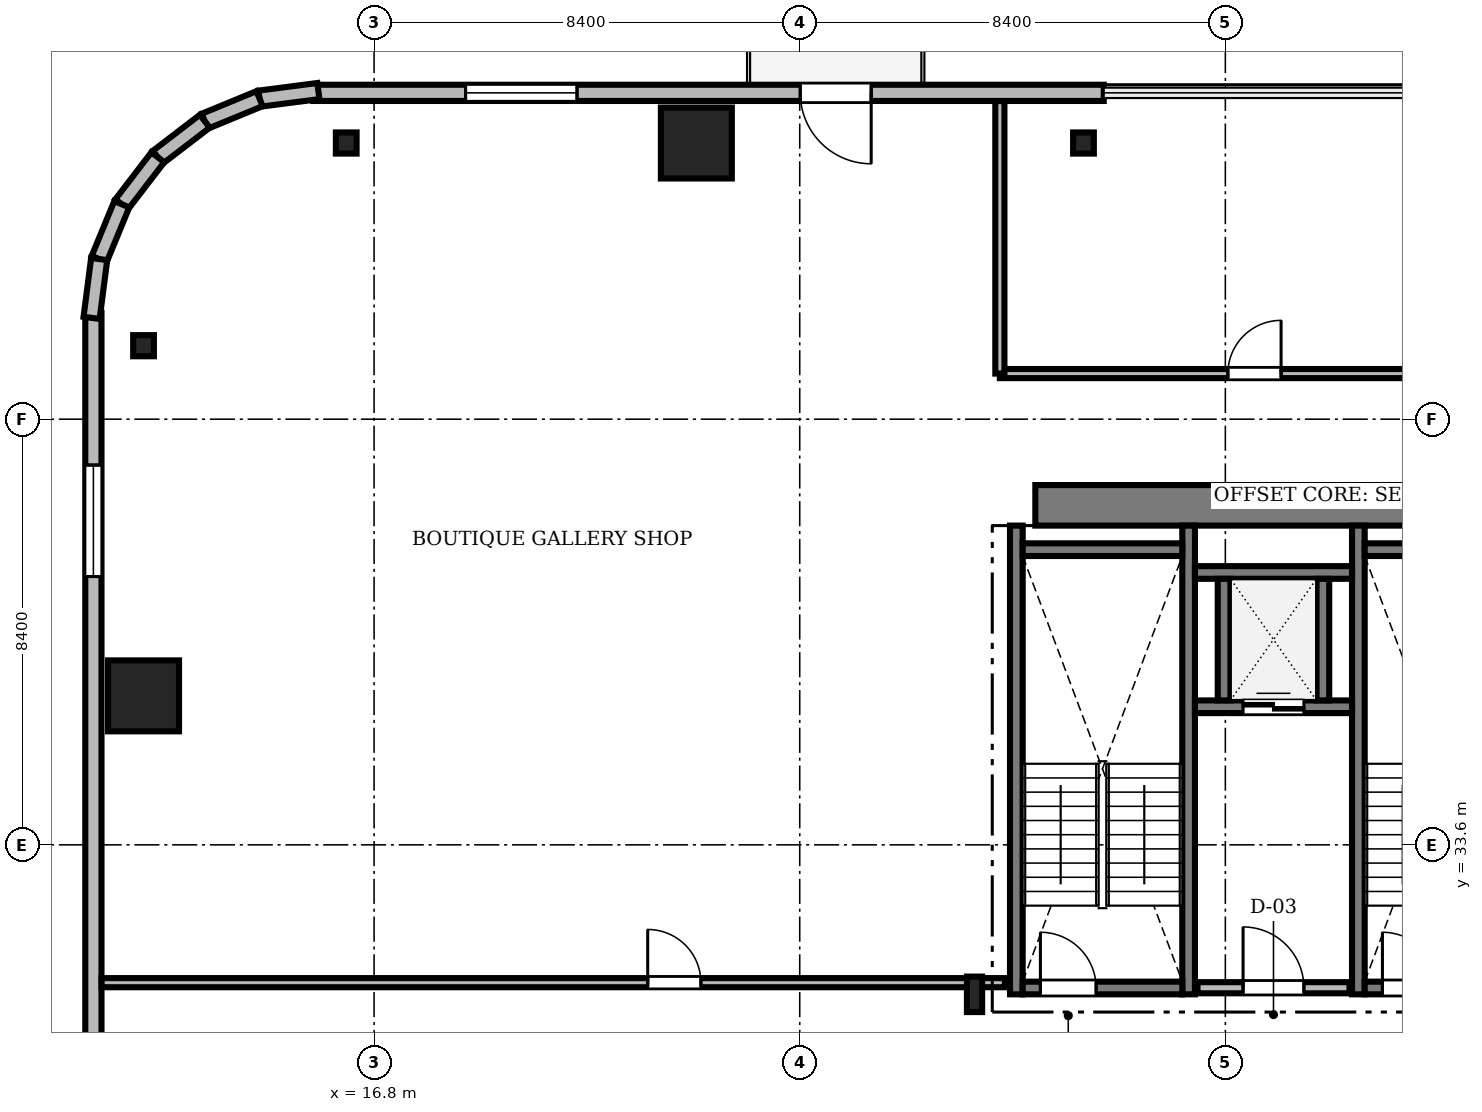
"""IFC4 building model, lengths in metres.
Left out: names, types, materials, properties, quantities, classifications, styles, units other than length and angle.
Written with IfcOpenShell. Run it as: python <this file> out.ifc"""

import sys

from ifc_helpers import new_model, si_unit, direction, frame, frame_2d, origin, origin_2d, place, context, subcontext, project, spatial, rectangle, i_section, extrude, source, transform, mapped, element, fill, save


model = new_model("IFC4")
c1 = context("Model", 3, precision=1e-05, world=origin(), true_north=direction((0.0, 1.0)))
c2 = subcontext(c1, "Body", "Model", "MODEL_VIEW")
j1 = project(units=[si_unit("LENGTHUNIT", "METRE"), si_unit("PLANEANGLEUNIT", "RADIAN")], contexts=[c1])
p1 = place(None, origin())
s1 = spatial("IfcSite", under=j1, at=p1, CompositionType="ELEMENT")
p2 = place(p1, origin())
s2 = spatial("IfcBuilding", under=s1, at=p2, CompositionType="ELEMENT")
p3 = place(p2, frame((0.0, 0.0, 229.8)))
s3 = spatial("IfcBuildingStorey", under=s2, at=p3, CompositionType="ELEMENT", Elevation=229.8)
m1 = source(origin(), c2, "Body", "SweptSolid", [
    extrude(rectangle(XDim=17.52, YDim=0.8, at=frame_2d((8.76, 0.0))), origin(), (0.0, 0.0, 1.0), 3.53),
])
p4 = place(p3, frame((29.85, 40.3, 0.0), z_axis=(0.0, 0.0, 1.0), x_axis=(1.0, 0.0, 0.0)))
e1 = element("IfcWall", 1, at=p4, inside=s3, PredefinedType="SHEAR", context=c2, shape_type="MappedRepresentation", body=[
    mapped(m1, transform((0.0, 0.0, 0.0), scale=1.0)),
])
m2 = source(origin(), c2, "Body", "SweptSolid", [
    extrude(i_section(OverallWidth=0.3, OverallDepth=0.7, WebThickness=0.017, FlangeThickness=0.032, FilletRadius=0.027, at=origin_2d()), origin(), (0.0, 0.0, 1.0), 3.53),
])
p5 = place(p3, frame((28.65, 30.65, 0.0), z_axis=(0.0, 0.0, 1.0), x_axis=(1.0, 0.0, 0.0)))
e2 = element("IfcColumn", 2, at=p5, inside=s3, PredefinedType="COLUMN", context=c2, shape_type="MappedRepresentation", body=[
    mapped(m2, transform((0.0, 0.0, 0.0), scale=1.0)),
])
m3 = source(origin(), c2, "Body", "SweptSolid", [
    extrude(rectangle(XDim=1.4, YDim=1.4, at=origin_2d()), origin(), (0.0, 0.0, 1.0), 3.53),
])
for number, where, z_axis, x_axis in (
    (3, (23.16, 47.45, 0.0), (0.0, 0.0, 1.0), (1.0, 0.0, 0.0)),
    (4, (12.25, 36.54, 0.0), (0.0, 0.0, 1.0), (1.0, 0.0, 0.0)),
):
    element("IfcColumn", number, at=place(p3, frame(where, z_axis=z_axis, x_axis=x_axis)), inside=s3, PredefinedType="COLUMN", context=c2, shape_type="MappedRepresentation", body=[
        mapped(m3, transform((0.0, 0.0, 0.0), scale=1.0)),
    ])
m4 = source(origin(), c2, "Body", "SweptSolid", [
    extrude(i_section(OverallWidth=0.409, OverallDepth=0.417, WebThickness=0.021, FlangeThickness=0.033, FilletRadius=0.015, at=origin_2d()), origin(), (0.0, 0.0, 1.0), 3.53),
])
for number, where, z_axis, x_axis in (
    (5, (30.8, 47.45, 0.0), (0.0, 0.0, 1.0), (1.0, 0.0, 0.0)),
    (6, (16.25, 47.45, 0.0), (0.0, 0.0, 1.0), (1.0, 0.0, 0.0)),
    (7, (12.25, 43.45, 0.0), (0.0, 0.0, 1.0), (1.0, 0.0, 0.0)),
):
    element("IfcColumn", number, at=place(p3, frame(where, z_axis=z_axis, x_axis=x_axis)), inside=s3, PredefinedType="COLUMN", context=c2, shape_type="MappedRepresentation", body=[
        mapped(m4, transform((0.0, 0.0, 0.0), scale=1.0)),
    ])
m5 = source(origin(), c2, "Body", "SweptSolid", [
    extrude(rectangle(XDim=15.6, YDim=0.32, at=frame_2d((7.8, 0.0))), origin(), (0.0, 0.0, 1.0), 3.53),
])
p6 = place(p3, frame((31.2, 48.44, 0.0), z_axis=(0.0, 0.0, 1.0), x_axis=(-1.0, 0.0, 0.0)))
e8 = element("IfcWall", 8, at=p6, inside=s3, PredefinedType="SOLIDWALL", context=c2, shape_type="MappedRepresentation", body=[
    mapped(m5, transform((0.0, 0.0, 0.0), scale=1.0)),
])
m6 = source(origin(), c2, "Body", "SweptSolid", [
    extrude(rectangle(XDim=1.4, YDim=2.3, at=frame_2d((0.7, 1.15))), frame((0.0, 0.17, 0.0), z_axis=(0.0, -1.0, 0.0), x_axis=(1.0, 0.0, 0.0)), (0.0, 0.0, 1.0), 0.34),
])
p7 = place(p6, frame((4.59, 0.0, 0.0)))
e9 = element("IfcOpeningElement", 9, at=p7, cuts=e8, PredefinedType="OPENING", context=c2, shape_type="MappedRepresentation", body=[
    mapped(m6, transform((0.0, 0.0, 0.0), scale=1.0)),
])
m7 = source(origin(), c2, "Body", "SweptSolid", [
    extrude(rectangle(XDim=2.2, YDim=2.4, at=frame_2d((1.1, 1.2))), frame((0.0, 0.17, 0.0), z_axis=(0.0, -1.0, 0.0), x_axis=(1.0, 0.0, 0.0)), (0.0, 0.0, 1.0), 0.34),
])
p8 = place(p6, frame((10.395, 0.0, 0.72)))
e10 = element("IfcOpeningElement", 10, at=p8, cuts=e8, PredefinedType="OPENING", context=c2, shape_type="MappedRepresentation", body=[
    mapped(m7, transform((0.0, 0.0, 0.0), scale=1.0)),
])
m8 = source(origin(), c2, "Body", "SweptSolid", [
    extrude(rectangle(XDim=15.6, YDim=0.32, at=frame_2d((7.8, 0.0))), origin(), (0.0, 0.0, 1.0), 3.53),
])
p9 = place(p3, frame((11.26, 44.1, 0.0), z_axis=(0.0, 0.0, 1.0), x_axis=(0.0, -1.0, 0.0)))
e11 = element("IfcWall", 11, at=p9, inside=s3, PredefinedType="SOLIDWALL", context=c2, shape_type="MappedRepresentation", body=[
    mapped(m8, transform((0.0, 0.0, 0.0), scale=1.0)),
])
p10 = place(p9, frame((3.005, 0.0, 0.72)))
e12 = element("IfcOpeningElement", 12, at=p10, cuts=e11, PredefinedType="OPENING", context=c2, shape_type="MappedRepresentation", body=[
    mapped(m7, transform((0.0, 0.0, 0.0), scale=1.0)),
])
m9 = source(origin(), c2, "Body", "SweptSolid", [
    extrude(rectangle(XDim=1.17, YDim=0.32, at=frame_2d((0.585, 0.0))), origin(), (0.0, 0.0, 1.0), 3.53),
])
p11 = place(p3, frame((15.7, 48.476, 0.0), z_axis=(0.0, 0.0, 1.0), x_axis=(-0.991735963317, -0.128295670475, 0.0)))
e13 = element("IfcWall", 13, at=p11, inside=s3, PredefinedType="SOLIDWALL", context=c2, shape_type="MappedRepresentation", body=[
    mapped(m9, transform((0.0, 0.0, 0.0), scale=1.0)),
])
m10 = source(origin(), c2, "Body", "SweptSolid", [
    extrude(rectangle(XDim=1.169, YDim=0.32, at=frame_2d((0.584, 0.0))), origin(), (0.0, 0.0, 1.0), 3.53),
])
p12 = place(p3, frame((14.54, 48.325, 0.0), z_axis=(0.0, 0.0, 1.0), x_axis=(-0.924552646638, -0.381054331552, 0.0)))
e14 = element("IfcWall", 14, at=p12, inside=s3, PredefinedType="SOLIDWALL", context=c2, shape_type="MappedRepresentation", body=[
    mapped(m10, transform((0.0, 0.0, 0.0), scale=1.0)),
])
m11 = source(origin(), c2, "Body", "SweptSolid", [
    extrude(rectangle(XDim=1.169, YDim=0.32, at=frame_2d((0.584, 0.0))), origin(), (0.0, 0.0, 1.0), 3.53),
])
p13 = place(p3, frame((13.459, 47.88, 0.0), z_axis=(0.0, 0.0, 1.0), x_axis=(-0.793663520347, -0.608356981114, 0.0)))
e15 = element("IfcWall", 15, at=p13, inside=s3, PredefinedType="SOLIDWALL", context=c2, shape_type="MappedRepresentation", body=[
    mapped(m11, transform((0.0, 0.0, 0.0), scale=1.0)),
])
m12 = source(origin(), c2, "Body", "SweptSolid", [
    extrude(rectangle(XDim=1.169, YDim=0.32, at=frame_2d((0.584, 0.0))), origin(), (0.0, 0.0, 1.0), 3.53),
])
p14 = place(p3, frame((12.531, 47.169, 0.0), z_axis=(0.0, 0.0, 1.0), x_axis=(-0.608387696831, -0.793639975269, 0.0)))
e16 = element("IfcWall", 16, at=p14, inside=s3, PredefinedType="SOLIDWALL", context=c2, shape_type="MappedRepresentation", body=[
    mapped(m12, transform((0.0, 0.0, 0.0), scale=1.0)),
])
p15 = place(p3, frame((11.82, 46.241, 0.0), z_axis=(0.0, 0.0, 1.0), x_axis=(-0.381054331552, -0.924552646638, 0.0)))
e17 = element("IfcWall", 17, at=p15, inside=s3, PredefinedType="SOLIDWALL", context=c2, shape_type="MappedRepresentation", body=[
    mapped(m10, transform((0.0, 0.0, 0.0), scale=1.0)),
])
p16 = place(p3, frame((11.375, 45.16, 0.0), z_axis=(0.0, 0.0, 1.0), x_axis=(-0.128295670475, -0.991735963317, 0.0)))
e18 = element("IfcWall", 18, at=p16, inside=s3, PredefinedType="SOLIDWALL", context=c2, shape_type="MappedRepresentation", body=[
    mapped(m9, transform((0.0, 0.0, 0.0), scale=1.0)),
])
m13 = source(origin(), c2, "Body", "SweptSolid", [
    extrude(rectangle(XDim=9.25, YDim=0.25, at=frame_2d((4.625, 0.0))), origin(), (0.0, 0.0, 1.0), 3.55),
])
for number, where, z_axis, x_axis in (
    (19, (29.475, 30.65, 0.0), (0.0, 0.0, 1.0), (0.0, 1.0, 0.0)),
    (20, (32.875, 30.65, 0.0), (0.0, 0.0, 1.0), (0.0, 1.0, 0.0)),
):
    element("IfcWall", number, at=place(p3, frame(where, z_axis=z_axis, x_axis=x_axis)), inside=s3, PredefinedType="SOLIDWALL", context=c2, shape_type="MappedRepresentation", body=[
        mapped(m13, transform((0.0, 0.0, 0.0), scale=1.0)),
    ])
m14 = source(origin(), c2, "Body", "SweptSolid", [
    extrude(rectangle(XDim=3.15, YDim=0.25, at=frame_2d((1.575, 0.0))), origin(), (0.0, 0.0, 1.0), 3.55),
])
p17 = place(p3, frame((29.6, 39.425, 0.0), z_axis=(0.0, 0.0, 1.0), x_axis=(1.0, 0.0, 0.0)))
e21 = element("IfcWall", 21, at=p17, inside=s3, PredefinedType="SOLIDWALL", context=c2, shape_type="MappedRepresentation", body=[
    mapped(m14, transform((0.0, 0.0, 0.0), scale=1.0)),
])
p18 = place(p3, frame((29.6, 30.775, 0.0), z_axis=(0.0, 0.0, 1.0), x_axis=(1.0, 0.0, 0.0)))
e22 = element("IfcWall", 22, at=p18, inside=s3, PredefinedType="SOLIDWALL", context=c2, shape_type="MappedRepresentation", body=[
    mapped(m14, transform((0.0, 0.0, 0.0), scale=1.0)),
])
m15 = source(origin(), c2, "Body", "SweptSolid", [
    extrude(rectangle(XDim=1.1, YDim=2.2, at=frame_2d((0.55, 1.1))), frame((0.0, 0.135, 0.0), z_axis=(0.0, -1.0, 0.0), x_axis=(1.0, 0.0, 0.0)), (0.0, 0.0, 1.0), 0.27),
])
p19 = place(p18, frame((0.35, 0.0, 0.0)))
e23 = element("IfcOpeningElement", 23, at=p19, cuts=e22, PredefinedType="OPENING", context=c2, shape_type="MappedRepresentation", body=[
    mapped(m15, transform((0.0, 0.0, 0.0), scale=1.0)),
])
p20 = place(p3, frame((36.225, 30.65, 0.0), z_axis=(0.0, 0.0, 1.0), x_axis=(0.0, 1.0, 0.0)))
e24 = element("IfcWall", 24, at=p20, inside=s3, PredefinedType="SOLIDWALL", context=c2, shape_type="MappedRepresentation", body=[
    mapped(m13, transform((0.0, 0.0, 0.0), scale=1.0)),
])
p21 = place(p3, frame((36.35, 39.425, 0.0), z_axis=(0.0, 0.0, 1.0), x_axis=(1.0, 0.0, 0.0)))
e25 = element("IfcWall", 25, at=p21, inside=s3, PredefinedType="SOLIDWALL", context=c2, shape_type="MappedRepresentation", body=[
    mapped(m14, transform((0.0, 0.0, 0.0), scale=1.0)),
])
p22 = place(p3, frame((36.35, 30.775, 0.0), z_axis=(0.0, 0.0, 1.0), x_axis=(1.0, 0.0, 0.0)))
e26 = element("IfcWall", 26, at=p22, inside=s3, PredefinedType="SOLIDWALL", context=c2, shape_type="MappedRepresentation", body=[
    mapped(m14, transform((0.0, 0.0, 0.0), scale=1.0)),
])
p23 = place(p22, frame((0.35, 0.0, 0.0)))
e27 = element("IfcOpeningElement", 27, at=p23, cuts=e26, PredefinedType="OPENING", context=c2, shape_type="MappedRepresentation", body=[
    mapped(m15, transform((0.0, 0.0, 0.0), scale=1.0)),
])
m16 = source(origin(), c2, "Body", "SweptSolid", [
    extrude(rectangle(XDim=3.0, YDim=0.22, at=frame_2d((1.5, 0.0))), origin(), (0.0, 0.0, 1.0), 3.53),
])
p24 = place(p3, frame((33.05, 30.78, 0.0), z_axis=(0.0, 0.0, 1.0), x_axis=(1.0, 0.0, 0.0)))
e28 = element("IfcWall", 28, at=p24, inside=s3, PredefinedType="SOLIDWALL", context=c2, shape_type="MappedRepresentation", body=[
    mapped(m16, transform((0.0, 0.0, 0.0), scale=1.0)),
])
m17 = source(origin(), c2, "Body", "SweptSolid", [
    extrude(rectangle(XDim=1.2, YDim=2.2, at=frame_2d((0.6, 1.1))), frame((0.0, 0.12, 0.0), z_axis=(0.0, -1.0, 0.0), x_axis=(1.0, 0.0, 0.0)), (0.0, 0.0, 1.0), 0.24),
])
p25 = place(p24, frame((0.9, 0.0, 0.0)))
e29 = element("IfcOpeningElement", 29, at=p25, cuts=e28, PredefinedType="OPENING", context=c2, shape_type="MappedRepresentation", body=[
    mapped(m17, transform((0.0, 0.0, 0.0), scale=1.0)),
])
m18 = source(origin(), c2, "Body", "SweptSolid", [
    extrude(rectangle(XDim=3.1, YDim=0.25, at=frame_2d((1.55, 0.0))), origin(), (0.0, 0.0, 1.0), 3.53),
])
p26 = place(p3, frame((33.0, 36.325, 0.0), z_axis=(0.0, 0.0, 1.0), x_axis=(1.0, 0.0, 0.0)))
e30 = element("IfcWall", 30, at=p26, inside=s3, PredefinedType="SOLIDWALL", context=c2, shape_type="MappedRepresentation", body=[
    mapped(m18, transform((0.0, 0.0, 0.0), scale=1.0)),
])
m19 = source(origin(), c2, "Body", "SweptSolid", [
    extrude(rectangle(XDim=1.2, YDim=2.25, at=frame_2d((0.6, 1.125))), frame((0.0, 0.135, 0.0), z_axis=(0.0, -1.0, 0.0), x_axis=(1.0, 0.0, 0.0)), (0.0, 0.0, 1.0), 0.27),
])
p27 = place(p26, frame((0.95, 0.0, 0.0)))
e31 = element("IfcOpeningElement", 31, at=p27, cuts=e30, PredefinedType="OPENING", context=c2, shape_type="MappedRepresentation", body=[
    mapped(m19, transform((0.0, 0.0, 0.0), scale=1.0)),
])
p28 = place(p3, frame((33.0, 38.975, 0.0), z_axis=(0.0, 0.0, 1.0), x_axis=(1.0, 0.0, 0.0)))
e32 = element("IfcWall", 32, at=p28, inside=s3, PredefinedType="SOLIDWALL", context=c2, shape_type="MappedRepresentation", body=[
    mapped(m18, transform((0.0, 0.0, 0.0), scale=1.0)),
])
m20 = source(origin(), c2, "Body", "SweptSolid", [
    extrude(rectangle(XDim=2.4, YDim=0.25, at=frame_2d((1.2, 0.0))), origin(), (0.0, 0.0, 1.0), 3.53),
])
for number, where, z_axis, x_axis in (
    (33, (33.575, 36.45, 0.0), (0.0, 0.0, 1.0), (0.0, 1.0, 0.0)),
    (34, (35.525, 36.45, 0.0), (0.0, 0.0, 1.0), (0.0, 1.0, 0.0)),
):
    element("IfcWall", number, at=place(p3, frame(where, z_axis=z_axis, x_axis=x_axis)), inside=s3, PredefinedType="SOLIDWALL", context=c2, shape_type="MappedRepresentation", body=[
        mapped(m20, transform((0.0, 0.0, 0.0), scale=1.0)),
    ])
m21 = source(origin(), c2, "Body", "SweptSolid", [
    extrude(rectangle(XDim=28.428, YDim=0.18, at=frame_2d((14.214, 0.0))), origin(), (0.0, 0.0, 1.0), 2.772),
])
p29 = place(p3, frame((29.15, 42.9, 0.0), z_axis=(0.0, 0.0, 1.0), x_axis=(1.0, 0.0, 0.0)))
e35 = element("IfcWall", 35, at=p29, inside=s3, PredefinedType="PARTITIONING", context=c2, shape_type="MappedRepresentation", body=[
    mapped(m21, transform((0.0, 0.0, 0.0), scale=1.0)),
])
m22 = source(origin(), c2, "Body", "SweptSolid", [
    extrude(rectangle(XDim=1.05, YDim=2.2, at=frame_2d((0.525, 1.1))), frame((0.0, 0.1, 0.0), z_axis=(0.0, -1.0, 0.0), x_axis=(1.0, 0.0, 0.0)), (0.0, 0.0, 1.0), 0.2),
])
p30 = place(p29, frame((4.5, 0.0, 0.0)))
e36 = element("IfcOpeningElement", 36, at=p30, cuts=e35, PredefinedType="OPENING", context=c2, shape_type="MappedRepresentation", body=[
    mapped(m22, transform((0.0, 0.0, 0.0), scale=1.0)),
])
m23 = source(origin(), c2, "Body", "SweptSolid", [
    extrude(rectangle(XDim=17.828, YDim=0.18, at=frame_2d((8.914, 0.0))), origin(), (0.0, 0.0, 1.0), 2.772),
])
p31 = place(p3, frame((11.422, 30.88, 0.0), z_axis=(0.0, 0.0, 1.0), x_axis=(1.0, 0.0, 0.0)))
e37 = element("IfcWall", 37, at=p31, inside=s3, PredefinedType="PARTITIONING", context=c2, shape_type="MappedRepresentation", body=[
    mapped(m23, transform((0.0, 0.0, 0.0), scale=1.0)),
])
p32 = place(p31, frame((10.778, 0.0, 0.0)))
e38 = element("IfcOpeningElement", 38, at=p32, cuts=e37, PredefinedType="OPENING", context=c2, shape_type="MappedRepresentation", body=[
    mapped(m22, transform((0.0, 0.0, 0.0), scale=1.0)),
])
m24 = source(origin(), c2, "Body", "SweptSolid", [
    extrude(rectangle(XDim=5.378, YDim=0.18, at=frame_2d((2.689, 0.0))), origin(), (0.0, 0.0, 1.0), 2.772),
])
p33 = place(p3, frame((29.15, 42.9, 0.0), z_axis=(0.0, 0.0, 1.0), x_axis=(0.0, 1.0, 0.0)))
e39 = element("IfcWall", 39, at=p33, inside=s3, PredefinedType="PARTITIONING", context=c2, shape_type="MappedRepresentation", body=[
    mapped(m24, transform((0.0, 0.0, 0.0), scale=1.0)),
])
m25 = source(origin(), c2, "Body", "SweptSolid", [
    extrude(rectangle(XDim=1.4, YDim=2.3, at=frame_2d((0.7, 1.15))), frame((0.0, 0.025, 0.0), z_axis=(0.0, -1.0, 0.0), x_axis=(1.0, 0.0, 0.0)), (0.0, 0.0, 1.0), 0.05),
])
p34 = place(p7, frame((1.4, 0.0, 0.0), z_axis=(0.0, 0.0, 1.0), x_axis=(-1.0, 0.0, 0.0)))
e40 = element("IfcDoor", 40, at=p34, inside=s3, OperationType="DOUBLE_DOOR_SLIDING", PredefinedType="DOOR", context=c2, shape_type="MappedRepresentation", body=[
    mapped(m25, transform((0.0, 0.0, 0.0), scale=1.0)),
])
fill(e9, e40)
m26 = source(origin(), c2, "Body", "SweptSolid", [
    extrude(rectangle(XDim=2.2, YDim=2.4, at=frame_2d((1.1, 1.2))), frame((0.0, 0.03, 0.0), z_axis=(0.0, -1.0, 0.0), x_axis=(1.0, 0.0, 0.0)), (0.0, 0.0, 1.0), 0.06),
])
p35 = place(p8, origin())
e41 = element("IfcWindow", 41, at=p35, inside=s3, PartitioningType="SINGLE_PANEL", PredefinedType="WINDOW", context=c2, shape_type="MappedRepresentation", body=[
    mapped(m26, transform((0.0, 0.0, 0.0), scale=1.0)),
])
fill(e10, e41)
p36 = place(p10, origin())
e42 = element("IfcWindow", 42, at=p36, inside=s3, PartitioningType="SINGLE_PANEL", PredefinedType="WINDOW", context=c2, shape_type="MappedRepresentation", body=[
    mapped(m26, transform((0.0, 0.0, 0.0), scale=1.0)),
])
fill(e12, e42)
m27 = source(origin(), c2, "Body", "SweptSolid", [
    extrude(rectangle(XDim=1.1, YDim=2.2, at=frame_2d((0.55, 1.1))), frame((0.0, 0.025, 0.0), z_axis=(0.0, -1.0, 0.0), x_axis=(1.0, 0.0, 0.0)), (0.0, 0.0, 1.0), 0.05),
])
p37 = place(p19, origin())
e43 = element("IfcDoor", 43, at=p37, inside=s3, OperationType="SINGLE_SWING_LEFT", PredefinedType="DOOR", context=c2, shape_type="MappedRepresentation", body=[
    mapped(m27, transform((0.0, 0.0, 0.0), scale=1.0)),
])
fill(e23, e43)
p38 = place(p23, origin())
e44 = element("IfcDoor", 44, at=p38, inside=s3, OperationType="SINGLE_SWING_LEFT", PredefinedType="DOOR", context=c2, shape_type="MappedRepresentation", body=[
    mapped(m27, transform((0.0, 0.0, 0.0), scale=1.0)),
])
fill(e27, e44)
m28 = source(origin(), c2, "Body", "SweptSolid", [
    extrude(rectangle(XDim=1.2, YDim=2.2, at=frame_2d((0.6, 1.1))), frame((0.0, 0.025, 0.0), z_axis=(0.0, -1.0, 0.0), x_axis=(1.0, 0.0, 0.0)), (0.0, 0.0, 1.0), 0.05),
])
p39 = place(p25, origin())
e45 = element("IfcDoor", 45, at=p39, inside=s3, OperationType="SINGLE_SWING_LEFT", PredefinedType="DOOR", context=c2, shape_type="MappedRepresentation", body=[
    mapped(m28, transform((0.0, 0.0, 0.0), scale=1.0)),
])
fill(e29, e45)
m29 = source(origin(), c2, "Body", "SweptSolid", [
    extrude(rectangle(XDim=1.2, YDim=2.25, at=frame_2d((0.6, 1.125))), frame((0.0, 0.025, 0.0), z_axis=(0.0, -1.0, 0.0), x_axis=(1.0, 0.0, 0.0)), (0.0, 0.0, 1.0), 0.05),
])
p40 = place(p27, origin())
e46 = element("IfcDoor", 46, at=p40, inside=s3, OperationType="DOUBLE_DOOR_SLIDING", PredefinedType="DOOR", context=c2, shape_type="MappedRepresentation", body=[
    mapped(m29, transform((0.0, 0.0, 0.0), scale=1.0)),
])
fill(e31, e46)
m30 = source(origin(), c2, "Body", "SweptSolid", [
    extrude(rectangle(XDim=1.05, YDim=2.2, at=frame_2d((0.525, 1.1))), frame((0.0, 0.025, 0.0), z_axis=(0.0, -1.0, 0.0), x_axis=(1.0, 0.0, 0.0)), (0.0, 0.0, 1.0), 0.05),
])
p41 = place(p30, origin())
e47 = element("IfcDoor", 47, at=p41, inside=s3, OperationType="SINGLE_SWING_RIGHT", PredefinedType="DOOR", context=c2, shape_type="MappedRepresentation", body=[
    mapped(m30, transform((0.0, 0.0, 0.0), scale=1.0)),
])
fill(e36, e47)
p42 = place(p32, origin())
e48 = element("IfcDoor", 48, at=p42, inside=s3, OperationType="SINGLE_SWING_LEFT", PredefinedType="DOOR", context=c2, shape_type="MappedRepresentation", body=[
    mapped(m30, transform((0.0, 0.0, 0.0), scale=1.0)),
])
fill(e38, e48)
save(model, sys.argv[1])
